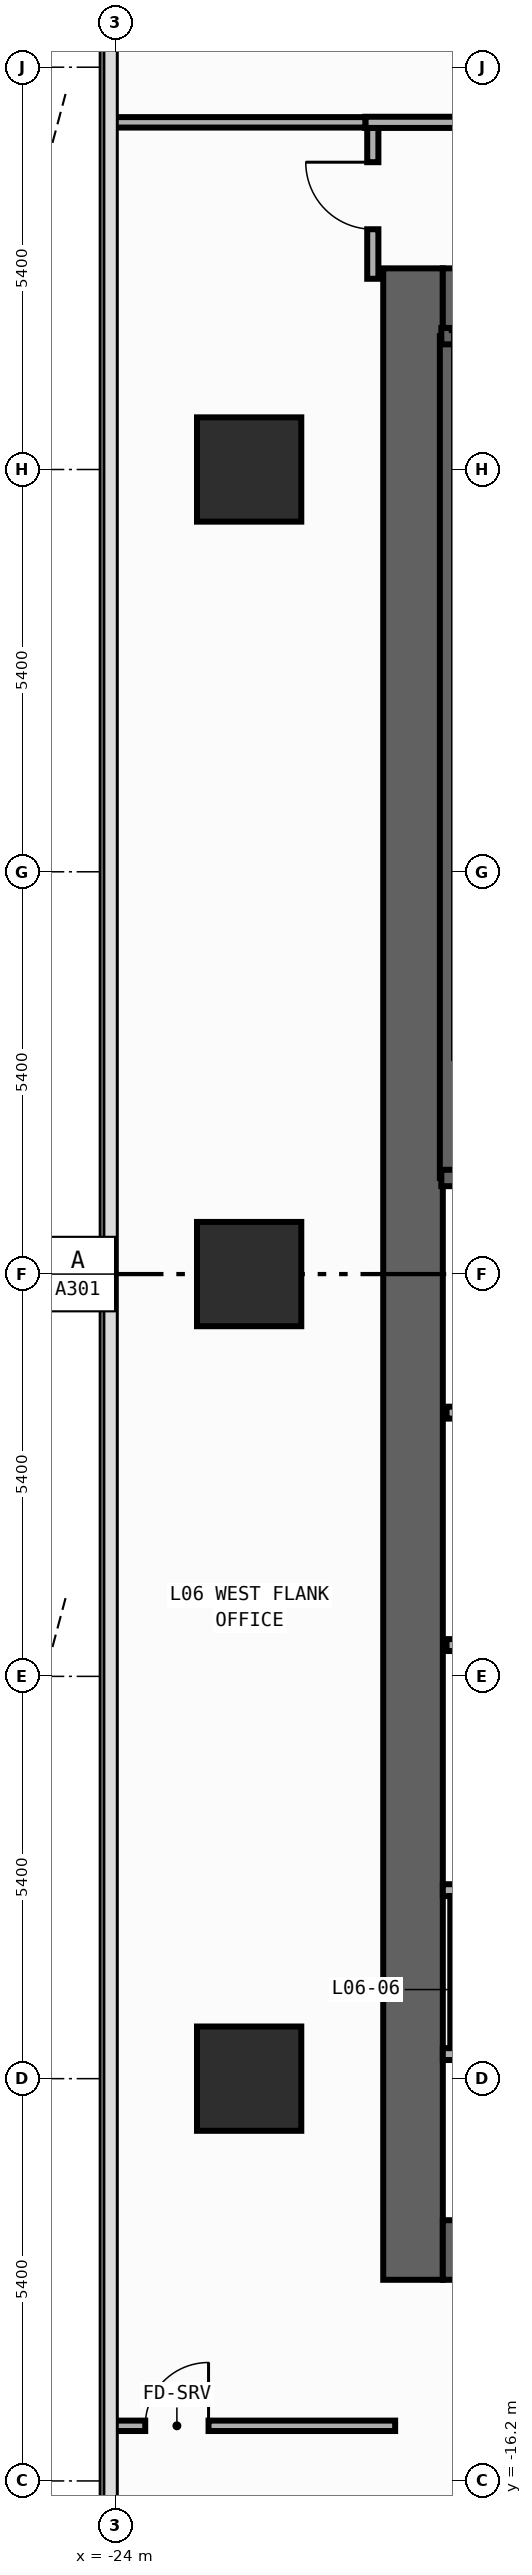
"""IFC4 building model, lengths in metres.
Left out: names, types, materials, properties, quantities, classifications, styles, units other than length and angle.
Written with IfcOpenShell. Run it as: python <this file> out.ifc"""

import sys

from ifc_helpers import new_model, si_unit, direction, frame, frame_2d, origin, origin_2d, place, context, subcontext, project, spatial, rectangle, extrude, element, fill, save


model = new_model("IFC4")
c1 = context("Model", 3, precision=1e-05, world=origin(), true_north=direction((0.0, 1.0)))
c2 = subcontext(c1, "Body", "Model", "MODEL_VIEW")
j1 = project(units=[si_unit("LENGTHUNIT", "METRE"), si_unit("PLANEANGLEUNIT", "RADIAN")], contexts=[c1])
p1 = place(None, origin())
s1 = spatial("IfcSite", under=j1, at=p1, CompositionType="ELEMENT")
p2 = place(p1, origin())
s2 = spatial("IfcBuilding", under=s1, at=p2, CompositionType="ELEMENT")
p3 = place(p2, frame((0.0, 0.0, 26.0)))
s3 = spatial("IfcBuildingStorey", under=s2, at=p3, CompositionType="ELEMENT", Elevation=26.0)
p4 = place(p3, frame((-20.0, -13.5, 0.0), z_axis=(0.0, 0.0, 1.0), x_axis=(0.0, 1.0, 0.0)))
e1 = element("IfcWall", 1, at=p4, inside=s3, PredefinedType="SHEAR", context=c2, shape_type="SweptSolid", body=[
    extrude(rectangle(XDim=27.0, YDim=0.8, at=frame_2d((13.5, 0.0))), origin(), (0.0, 0.0, 1.0), 3.94),
])
for number, where, z_axis, x_axis in (
    (2, (-19.6, -13.1, 0.0), (0.0, 0.0, 1.0), (1.0, 0.0, 0.0)),
    (3, (-19.6, 13.1, 0.0), (0.0, 0.0, 1.0), (1.0, 0.0, 0.0)),
):
    element("IfcWall", number, at=place(p3, frame(where, z_axis=z_axis, x_axis=x_axis)), inside=s3, PredefinedType="SHEAR", context=c2, shape_type="SweptSolid", body=[
        extrude(rectangle(XDim=6.8, YDim=0.8, at=frame_2d((3.4, 0.0))), origin(), (0.0, 0.0, 1.0), 3.94),
    ])
p5 = place(p3, frame((-19.53, 1.29, 0.0), z_axis=(0.0, 0.0, 1.0), x_axis=(0.0, 1.0, 0.0)))
e4 = element("IfcWall", 4, at=p5, inside=s3, PredefinedType="SHEAR", context=c2, shape_type="SweptSolid", body=[
    extrude(rectangle(XDim=11.3, YDim=0.22, at=frame_2d((5.65, 0.0))), origin(), (0.0, 0.0, 1.0), 3.94),
])
p6 = place(p3, frame((-19.62, 12.59, 0.0), z_axis=(0.0, 0.0, 1.0), x_axis=(1.0, 0.0, 0.0)))
e5 = element("IfcWall", 5, at=p6, inside=s3, PredefinedType="SHEAR", context=c2, shape_type="SweptSolid", body=[
    extrude(rectangle(XDim=3.915, YDim=0.22, at=frame_2d((1.958, 0.0))), origin(), (0.0, 0.0, 1.0), 3.94),
])
p7 = place(p3, frame((-19.62, 1.29, 0.0), z_axis=(0.0, 0.0, 1.0), x_axis=(1.0, 0.0, 0.0)))
e6 = element("IfcWall", 6, at=p7, inside=s3, PredefinedType="SHEAR", context=c2, shape_type="SweptSolid", body=[
    extrude(rectangle(XDim=3.915, YDim=0.22, at=frame_2d((1.958, 0.0))), origin(), (0.0, 0.0, 1.0), 3.94),
])
p8 = place(p7, frame((1.08, 0.0, 0.0)))
e7 = element("IfcOpeningElement", 7, at=p8, cuts=e6, PredefinedType="OPENING", context=c2, shape_type="SweptSolid", body=[
    extrude(rectangle(XDim=1.1, YDim=2.2, at=frame_2d((0.55, 1.1))), frame((0.0, 0.12, 0.0), z_axis=(0.0, -1.0, 0.0), x_axis=(1.0, 0.0, 0.0)), (0.0, 0.0, 1.0), 0.24),
])
for number, where, z_axis, x_axis in (
    (8, (-22.2, -10.8, 0.0), (0.0, 0.0, 1.0), (1.0, 0.0, 0.0)),
    (9, (-22.2, 0.0, 0.0), (0.0, 0.0, 1.0), (1.0, 0.0, 0.0)),
    (10, (-22.2, 10.8, 0.0), (0.0, 0.0, 1.0), (1.0, 0.0, 0.0)),
):
    element("IfcColumn", number, at=place(p3, frame(where, z_axis=z_axis, x_axis=x_axis)), inside=s3, PredefinedType="COLUMN", context=c2, shape_type="SweptSolid", body=[
        extrude(rectangle(XDim=1.4, YDim=1.4, at=origin_2d()), origin(), (0.0, 0.0, 1.0), 4.2),
    ])
p9 = place(p3, frame((-19.55, -1.86, 0.0), z_axis=(0.0, 0.0, 1.0), x_axis=(1.0, 0.0, 0.0)))
e11 = element("IfcWall", 11, at=p9, inside=s3, PredefinedType="STANDARD", context=c2, shape_type="SweptSolid", body=[
    extrude(rectangle(XDim=3.8, YDim=0.16, at=frame_2d((1.9, 0.0))), origin(), (0.0, 0.0, 1.0), 3.94),
])
p10 = place(p9, frame((1.18, 0.0, 0.0)))
e12 = element("IfcOpeningElement", 12, at=p10, cuts=e11, PredefinedType="OPENING", context=c2, shape_type="SweptSolid", body=[
    extrude(rectangle(XDim=1.15, YDim=2.2, at=frame_2d((0.575, 1.1))), frame((0.0, 0.09, 0.0), z_axis=(0.0, -1.0, 0.0), x_axis=(1.0, 0.0, 0.0)), (0.0, 0.0, 1.0), 0.18),
])
p11 = place(p3, frame((-19.55, -4.98, 0.0), z_axis=(0.0, 0.0, 1.0), x_axis=(1.0, 0.0, 0.0)))
e13 = element("IfcWall", 13, at=p11, inside=s3, PredefinedType="STANDARD", context=c2, shape_type="SweptSolid", body=[
    extrude(rectangle(XDim=3.8, YDim=0.16, at=frame_2d((1.9, 0.0))), origin(), (0.0, 0.0, 1.0), 3.94),
])
for number, where, z_axis, x_axis in (
    (14, (-19.6, -10.47, 0.0), (0.0, 0.0, 1.0), (1.0, 0.0, 0.0)),
    (15, (-19.6, -8.27, 0.0), (0.0, 0.0, 1.0), (1.0, 0.0, 0.0)),
):
    element("IfcWall", number, at=place(p3, frame(where, z_axis=z_axis, x_axis=x_axis)), inside=s3, PredefinedType="PARTITIONING", context=c2, shape_type="SweptSolid", body=[
        extrude(rectangle(XDim=2.29, YDim=0.16, at=frame_2d((1.145, 0.0))), origin(), (0.0, 0.0, 1.0), 3.94),
    ])
p12 = place(p3, frame((-20.54, 13.36, 0.0), z_axis=(0.0, 0.0, 1.0), x_axis=(0.0, 1.0, 0.0)))
e16 = element("IfcWall", 16, at=p12, inside=s3, PredefinedType="PARTITIONING", context=c2, shape_type="SweptSolid", body=[
    extrude(rectangle(XDim=2.025, YDim=0.15, at=frame_2d((1.012, 0.0))), origin(), (0.0, 0.0, 1.0), 3.94),
])
p13 = place(p12, frame((0.665, 0.0, 0.0)))
e17 = element("IfcOpeningElement", 17, at=p13, cuts=e16, PredefinedType="OPENING", context=c2, shape_type="SweptSolid", body=[
    extrude(rectangle(XDim=0.9, YDim=2.15, at=frame_2d((0.45, 1.075))), frame((0.0, 0.085, 0.0), z_axis=(0.0, -1.0, 0.0), x_axis=(1.0, 0.0, 0.0)), (0.0, 0.0, 1.0), 0.17),
])
p14 = place(p3, frame((-20.64, 15.46, 0.0), z_axis=(0.0, 0.0, 1.0), x_axis=(1.0, 0.0, 0.0)))
e18 = element("IfcWall", 18, at=p14, inside=s3, PredefinedType="PARTITIONING", context=c2, shape_type="SweptSolid", body=[
    extrude(rectangle(XDim=8.65, YDim=0.15, at=frame_2d((4.325, 0.0))), origin(), (0.0, 0.0, 1.0), 3.94),
])
p15 = place(p14, frame((2.871, 0.0, 0.0)))
e19 = element("IfcOpeningElement", 19, at=p15, cuts=e18, PredefinedType="OPENING", context=c2, shape_type="SweptSolid", body=[
    extrude(rectangle(XDim=0.9, YDim=2.15, at=frame_2d((0.45, 1.075))), frame((0.0, 0.085, 0.0), z_axis=(0.0, -1.0, 0.0), x_axis=(1.0, 0.0, 0.0)), (0.0, 0.0, 1.0), 0.17),
])
p16 = place(p3, frame((-24.055, 15.46, 0.0), z_axis=(0.0, 0.0, 1.0), x_axis=(1.0, 0.0, 0.0)))
e20 = element("IfcWall", 20, at=p16, inside=s3, PredefinedType="PARTITIONING", context=c2, shape_type="SweptSolid", body=[
    extrude(rectangle(XDim=3.415, YDim=0.14, at=frame_2d((1.708, 0.0))), origin(), (0.0, 0.0, 1.0), 3.94),
])
p17 = place(p3, frame((-24.055, -15.46, 0.0), z_axis=(0.0, 0.0, 1.0), x_axis=(1.0, 0.0, 0.0)))
e21 = element("IfcWall", 21, at=p17, inside=s3, PredefinedType="PARTITIONING", context=c2, shape_type="SweptSolid", body=[
    extrude(rectangle(XDim=3.815, YDim=0.14, at=frame_2d((1.907, 0.0))), origin(), (0.0, 0.0, 1.0), 3.94),
])
p18 = place(p17, frame((0.46, 0.0, 0.0)))
e22 = element("IfcOpeningElement", 22, at=p18, cuts=e21, PredefinedType="OPENING", context=c2, shape_type="SweptSolid", body=[
    extrude(rectangle(XDim=0.85, YDim=2.1, at=frame_2d((0.425, 1.05))), frame((0.0, 0.08, 0.0), z_axis=(0.0, -1.0, 0.0), x_axis=(1.0, 0.0, 0.0)), (0.0, 0.0, 1.0), 0.16),
])
p19 = place(p3, frame((-19.45, -10.39, 0.0), z_axis=(0.0, 0.0, 1.0), x_axis=(0.0, 1.0, 0.0)))
e23 = element("IfcWall", 23, at=p19, inside=s3, PredefinedType="PARTITIONING", context=c2, shape_type="SweptSolid", body=[
    extrude(rectangle(XDim=2.04, YDim=0.1, at=frame_2d((1.02, 0.0))), origin(), (0.0, 0.0, 1.0), 3.94),
])
p20 = place(p13, origin())
e24 = element("IfcDoor", 24, at=p20, inside=s3, OperationType="SINGLE_SWING_RIGHT", PredefinedType="DOOR", context=c2, shape_type="SweptSolid", body=[
    extrude(rectangle(XDim=0.9, YDim=2.15, at=frame_2d((0.45, 1.075))), frame((0.0, 0.025, 0.0), z_axis=(0.0, -1.0, 0.0), x_axis=(1.0, 0.0, 0.0)), (0.0, 0.0, 1.0), 0.05),
])
fill(e17, e24)
p21 = place(p18, origin())
e25 = element("IfcDoor", 25, at=p21, inside=s3, OperationType="SINGLE_SWING_RIGHT", PredefinedType="DOOR", context=c2, shape_type="SweptSolid", body=[
    extrude(rectangle(XDim=0.85, YDim=2.1, at=frame_2d((0.425, 1.05))), frame((0.0, 0.025, 0.0), z_axis=(0.0, -1.0, 0.0), x_axis=(1.0, 0.0, 0.0)), (0.0, 0.0, 1.0), 0.05),
])
fill(e22, e25)
save(model, sys.argv[1])
